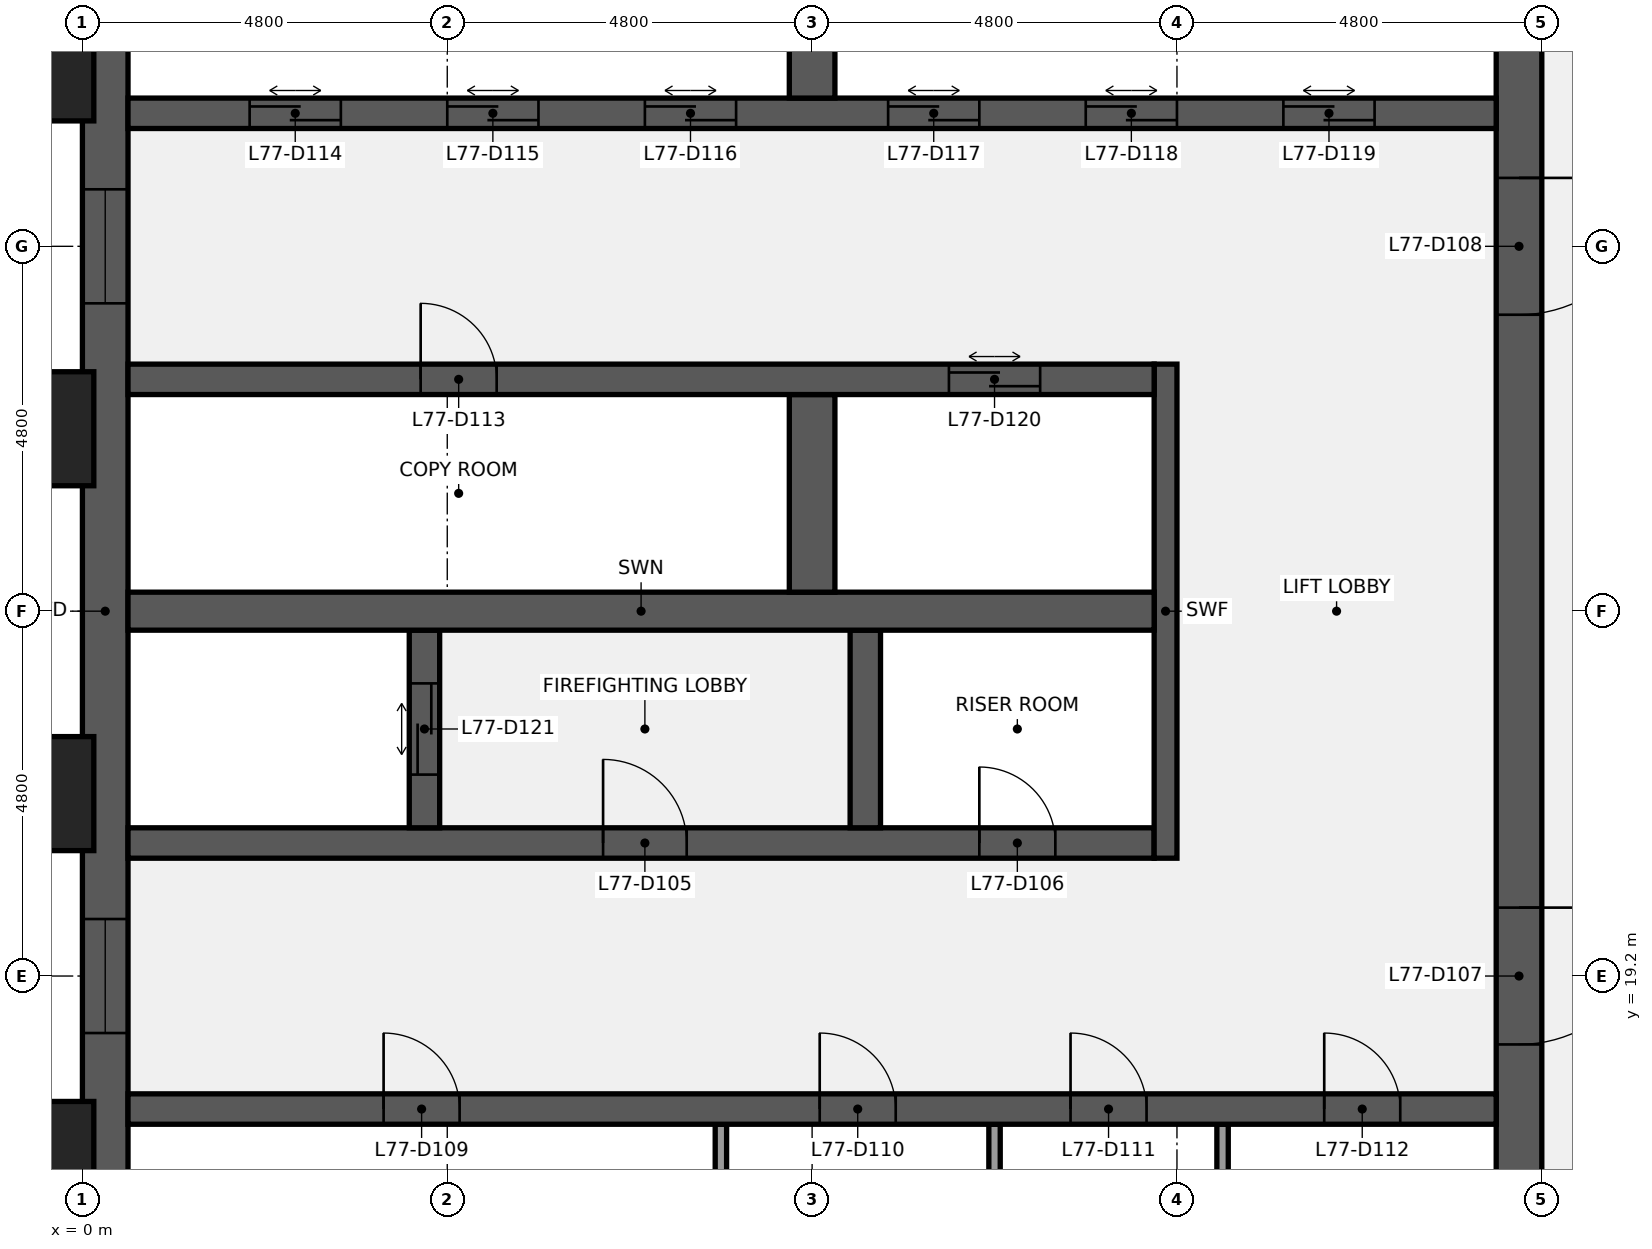
"""IFC4 building model, lengths in metres.
Left out: names, types, materials, properties, quantities, classifications, styles, units other than length and angle.
Written with IfcOpenShell. Run it as: python <this file> out.ifc"""

import sys

from ifc_helpers import new_model, si_unit, direction, frame, frame_2d, origin, origin_2d, place, context, subcontext, project, spatial, rectangle, extrude, element, fill, save


model = new_model("IFC4")
c1 = context("Model", 3, precision=1e-05, world=origin(), true_north=direction((0.0, 1.0)))
c2 = subcontext(c1, "Body", "Model", "MODEL_VIEW")
j1 = project(units=[si_unit("LENGTHUNIT", "METRE"), si_unit("PLANEANGLEUNIT", "RADIAN")], contexts=[c1])
p1 = place(None, origin())
s1 = spatial("IfcSite", under=j1, at=p1, CompositionType="ELEMENT")
p2 = place(p1, origin())
s2 = spatial("IfcBuilding", under=s1, at=p2, CompositionType="ELEMENT")
p3 = place(p2, frame((0.0, 0.0, 346.3)))
s3 = spatial("IfcBuildingStorey", under=s2, at=p3, CompositionType="ELEMENT", Elevation=346.3)
p4 = place(p3, frame((0.3, 9.6, 0.0), z_axis=(0.0, 0.0, 1.0), x_axis=(0.0, 1.0, 0.0)))
e1 = element("IfcWall", 1, at=p4, inside=s3, PredefinedType="SHEAR", context=c2, shape_type="SweptSolid", body=[
    extrude(rectangle(XDim=28.8, YDim=0.6, at=frame_2d((14.4, 0.0))), origin(), (0.0, 0.0, 1.0), 3.84),
])
p5 = place(p4, frame((8.85, 0.0, 0.9)))
e2 = element("IfcOpeningElement", 2, at=p5, cuts=e1, PredefinedType="OPENING", context=c2, shape_type="SweptSolid", body=[
    extrude(rectangle(XDim=1.5, YDim=1.5, at=frame_2d((0.75, 0.75))), frame((0.0, 0.31, 0.0), z_axis=(0.0, -1.0, 0.0), x_axis=(1.0, 0.0, 0.0)), (0.0, 0.0, 1.0), 0.62),
])
p6 = place(p4, frame((18.45, 0.0, 0.9)))
e3 = element("IfcOpeningElement", 3, at=p6, cuts=e1, PredefinedType="OPENING", context=c2, shape_type="SweptSolid", body=[
    extrude(rectangle(XDim=1.5, YDim=1.5, at=frame_2d((0.75, 0.75))), frame((0.0, 0.31, 0.0), z_axis=(0.0, -1.0, 0.0), x_axis=(1.0, 0.0, 0.0)), (0.0, 0.0, 1.0), 0.62),
])
p7 = place(p3, frame((18.9, 38.4, 0.0), z_axis=(0.0, 0.0, 1.0), x_axis=(0.0, -1.0, 0.0)))
e4 = element("IfcWall", 4, at=p7, inside=s3, PredefinedType="SHEAR", context=c2, shape_type="SweptSolid", body=[
    extrude(rectangle(XDim=28.8, YDim=0.6, at=frame_2d((14.4, 0.0))), origin(), (0.0, 0.0, 1.0), 3.84),
])
p8 = place(p7, frame((18.3, 0.0, 0.0)))
e5 = element("IfcOpeningElement", 5, at=p8, cuts=e4, PredefinedType="OPENING", context=c2, shape_type="SweptSolid", body=[
    extrude(rectangle(XDim=1.8, YDim=2.1, at=frame_2d((0.9, 1.05))), frame((0.0, 0.31, 0.0), z_axis=(0.0, -1.0, 0.0), x_axis=(1.0, 0.0, 0.0)), (0.0, 0.0, 1.0), 0.62),
])
p9 = place(p7, frame((8.7, 0.0, 0.0)))
e6 = element("IfcOpeningElement", 6, at=p9, cuts=e4, PredefinedType="OPENING", context=c2, shape_type="SweptSolid", body=[
    extrude(rectangle(XDim=1.8, YDim=2.1, at=frame_2d((0.9, 1.05))), frame((0.0, 0.31, 0.0), z_axis=(0.0, -1.0, 0.0), x_axis=(1.0, 0.0, 0.0)), (0.0, 0.0, 1.0), 0.62),
])
for number, where, z_axis, x_axis in (
    (7, (8.4, 14.65, 0.0), (0.0, 0.0, 1.0), (0.0, 1.0, 0.0)),
    (8, (12.0, 14.65, 0.0), (0.0, 0.0, 1.0), (0.0, 1.0, 0.0)),
    (9, (15.0, 14.65, 0.0), (0.0, 0.0, 1.0), (0.0, 1.0, 0.0)),
):
    element("IfcWall", number, at=place(p3, frame(where, z_axis=z_axis, x_axis=x_axis)), inside=s3, PredefinedType="PARTITIONING", context=c2, shape_type="SweptSolid", body=[
        extrude(rectangle(XDim=2.6, YDim=0.15, at=frame_2d((1.3, 0.0))), origin(), (0.0, 0.0, 1.0), 3.84),
    ])
p10 = place(p3, frame((0.6, 17.45, 0.0), z_axis=(0.0, 0.0, 1.0), x_axis=(1.0, 0.0, 0.0)))
e10 = element("IfcWall", 10, at=p10, inside=s3, PredefinedType="SHEAR", context=c2, shape_type="SweptSolid", body=[
    extrude(rectangle(XDim=18.0, YDim=0.4, at=frame_2d((9.0, 0.0))), origin(), (0.0, 0.0, 1.0), 3.84),
])
p11 = place(p10, frame((3.363, 0.0, 0.0)))
e11 = element("IfcOpeningElement", 11, at=p11, cuts=e10, PredefinedType="OPENING", context=c2, shape_type="SweptSolid", body=[
    extrude(rectangle(XDim=1.0, YDim=2.1, at=frame_2d((0.5, 1.05))), frame((0.0, 0.21, 0.0), z_axis=(0.0, -1.0, 0.0), x_axis=(1.0, 0.0, 0.0)), (0.0, 0.0, 1.0), 0.42),
])
p12 = place(p10, frame((9.1, 0.0, 0.0)))
e12 = element("IfcOpeningElement", 12, at=p12, cuts=e10, PredefinedType="OPENING", context=c2, shape_type="SweptSolid", body=[
    extrude(rectangle(XDim=1.0, YDim=2.1, at=frame_2d((0.5, 1.05))), frame((0.0, 0.21, 0.0), z_axis=(0.0, -1.0, 0.0), x_axis=(1.0, 0.0, 0.0)), (0.0, 0.0, 1.0), 0.42),
])
p13 = place(p10, frame((12.4, 0.0, 0.0)))
e13 = element("IfcOpeningElement", 13, at=p13, cuts=e10, PredefinedType="OPENING", context=c2, shape_type="SweptSolid", body=[
    extrude(rectangle(XDim=1.0, YDim=2.1, at=frame_2d((0.5, 1.05))), frame((0.0, 0.21, 0.0), z_axis=(0.0, -1.0, 0.0), x_axis=(1.0, 0.0, 0.0)), (0.0, 0.0, 1.0), 0.42),
])
p14 = place(p10, frame((15.738, 0.0, 0.0)))
e14 = element("IfcOpeningElement", 14, at=p14, cuts=e10, PredefinedType="OPENING", context=c2, shape_type="SweptSolid", body=[
    extrude(rectangle(XDim=1.0, YDim=2.1, at=frame_2d((0.5, 1.05))), frame((0.0, 0.21, 0.0), z_axis=(0.0, -1.0, 0.0), x_axis=(1.0, 0.0, 0.0)), (0.0, 0.0, 1.0), 0.42),
])
p15 = place(p3, frame((0.6, 20.95, 0.0), z_axis=(0.0, 0.0, 1.0), x_axis=(1.0, 0.0, 0.0)))
e15 = element("IfcWall", 15, at=p15, inside=s3, PredefinedType="SHEAR", context=c2, shape_type="SweptSolid", body=[
    extrude(rectangle(XDim=13.5, YDim=0.4, at=frame_2d((6.75, 0.0))), origin(), (0.0, 0.0, 1.0), 3.84),
])
p16 = place(p15, frame((6.25, 0.0, 0.0)))
e16 = element("IfcOpeningElement", 16, at=p16, cuts=e15, PredefinedType="OPENING", context=c2, shape_type="SweptSolid", body=[
    extrude(rectangle(XDim=1.1, YDim=2.1, at=frame_2d((0.55, 1.05))), frame((0.0, 0.21, 0.0), z_axis=(0.0, -1.0, 0.0), x_axis=(1.0, 0.0, 0.0)), (0.0, 0.0, 1.0), 0.42),
])
p17 = place(p15, frame((11.2, 0.0, 0.0)))
e17 = element("IfcOpeningElement", 17, at=p17, cuts=e15, PredefinedType="OPENING", context=c2, shape_type="SweptSolid", body=[
    extrude(rectangle(XDim=1.0, YDim=2.1, at=frame_2d((0.5, 1.05))), frame((0.0, 0.21, 0.0), z_axis=(0.0, -1.0, 0.0), x_axis=(1.0, 0.0, 0.0)), (0.0, 0.0, 1.0), 0.42),
])
p18 = place(p3, frame((14.25, 20.75, 0.0), z_axis=(0.0, 0.0, 1.0), x_axis=(0.0, 1.0, 0.0)))
e18 = element("IfcWall", 18, at=p18, inside=s3, PredefinedType="SHEAR", context=c2, shape_type="SweptSolid", body=[
    extrude(rectangle(XDim=6.5, YDim=0.3, at=frame_2d((3.25, 0.0))), origin(), (0.0, 0.0, 1.0), 3.84),
])
p19 = place(p3, frame((4.5, 21.15, 0.0), z_axis=(0.0, 0.0, 1.0), x_axis=(0.0, 1.0, 0.0)))
e19 = element("IfcWall", 19, at=p19, inside=s3, PredefinedType="SHEAR", context=c2, shape_type="SweptSolid", body=[
    extrude(rectangle(XDim=2.6, YDim=0.4, at=frame_2d((1.3, 0.0))), origin(), (0.0, 0.0, 1.0), 3.84),
])
p20 = place(p19, frame((0.7, 0.0, 0.0)))
e20 = element("IfcOpeningElement", 20, at=p20, cuts=e19, PredefinedType="OPENING", context=c2, shape_type="SweptSolid", body=[
    extrude(rectangle(XDim=1.2, YDim=2.1, at=frame_2d((0.6, 1.05))), frame((0.0, 0.21, 0.0), z_axis=(0.0, -1.0, 0.0), x_axis=(1.0, 0.0, 0.0)), (0.0, 0.0, 1.0), 0.42),
])
p21 = place(p3, frame((10.3, 21.15, 0.0), z_axis=(0.0, 0.0, 1.0), x_axis=(0.0, 1.0, 0.0)))
e21 = element("IfcWall", 21, at=p21, inside=s3, PredefinedType="SHEAR", context=c2, shape_type="SweptSolid", body=[
    extrude(rectangle(XDim=2.6, YDim=0.4, at=frame_2d((1.3, 0.0))), origin(), (0.0, 0.0, 1.0), 3.84),
])
p22 = place(p3, frame((0.6, 24.0, 0.0), z_axis=(0.0, 0.0, 1.0), x_axis=(1.0, 0.0, 0.0)))
e22 = element("IfcWall", 22, at=p22, inside=s3, PredefinedType="SHEAR", context=c2, shape_type="SweptSolid", body=[
    extrude(rectangle(XDim=13.5, YDim=0.5, at=frame_2d((6.75, 0.0))), origin(), (0.0, 0.0, 1.0), 3.84),
])
p23 = place(p3, frame((9.6, 24.25, 0.0), z_axis=(0.0, 0.0, 1.0), x_axis=(0.0, 1.0, 0.0)))
e23 = element("IfcWall", 23, at=p23, inside=s3, PredefinedType="SHEAR", context=c2, shape_type="SweptSolid", body=[
    extrude(rectangle(XDim=2.6, YDim=0.6, at=frame_2d((1.3, 0.0))), origin(), (0.0, 0.0, 1.0), 3.84),
])
p24 = place(p3, frame((0.6, 27.05, 0.0), z_axis=(0.0, 0.0, 1.0), x_axis=(1.0, 0.0, 0.0)))
e24 = element("IfcWall", 24, at=p24, inside=s3, PredefinedType="SHEAR", context=c2, shape_type="SweptSolid", body=[
    extrude(rectangle(XDim=13.5, YDim=0.4, at=frame_2d((6.75, 0.0))), origin(), (0.0, 0.0, 1.0), 3.84),
])
p25 = place(p24, frame((3.85, 0.0, 0.0)))
e25 = element("IfcOpeningElement", 25, at=p25, cuts=e24, PredefinedType="OPENING", context=c2, shape_type="SweptSolid", body=[
    extrude(rectangle(XDim=1.0, YDim=2.1, at=frame_2d((0.5, 1.05))), frame((0.0, 0.21, 0.0), z_axis=(0.0, -1.0, 0.0), x_axis=(1.0, 0.0, 0.0)), (0.0, 0.0, 1.0), 0.42),
])
p26 = place(p24, frame((10.8, 0.0, 0.0)))
e26 = element("IfcOpeningElement", 26, at=p26, cuts=e24, PredefinedType="OPENING", context=c2, shape_type="SweptSolid", body=[
    extrude(rectangle(XDim=1.2, YDim=2.1, at=frame_2d((0.6, 1.05))), frame((0.0, 0.21, 0.0), z_axis=(0.0, -1.0, 0.0), x_axis=(1.0, 0.0, 0.0)), (0.0, 0.0, 1.0), 0.42),
])
p27 = place(p3, frame((0.6, 30.55, 0.0), z_axis=(0.0, 0.0, 1.0), x_axis=(1.0, 0.0, 0.0)))
e27 = element("IfcWall", 27, at=p27, inside=s3, PredefinedType="SHEAR", context=c2, shape_type="SweptSolid", body=[
    extrude(rectangle(XDim=18.0, YDim=0.4, at=frame_2d((9.0, 0.0))), origin(), (0.0, 0.0, 1.0), 3.84),
])
p28 = place(p27, frame((1.6, 0.0, 0.0)))
e28 = element("IfcOpeningElement", 28, at=p28, cuts=e27, PredefinedType="OPENING", context=c2, shape_type="SweptSolid", body=[
    extrude(rectangle(XDim=1.2, YDim=2.1, at=frame_2d((0.6, 1.05))), frame((0.0, 0.21, 0.0), z_axis=(0.0, -1.0, 0.0), x_axis=(1.0, 0.0, 0.0)), (0.0, 0.0, 1.0), 0.42),
])
p29 = place(p27, frame((4.2, 0.0, 0.0)))
e29 = element("IfcOpeningElement", 29, at=p29, cuts=e27, PredefinedType="OPENING", context=c2, shape_type="SweptSolid", body=[
    extrude(rectangle(XDim=1.2, YDim=2.1, at=frame_2d((0.6, 1.05))), frame((0.0, 0.21, 0.0), z_axis=(0.0, -1.0, 0.0), x_axis=(1.0, 0.0, 0.0)), (0.0, 0.0, 1.0), 0.42),
])
p30 = place(p27, frame((6.8, 0.0, 0.0)))
e30 = element("IfcOpeningElement", 30, at=p30, cuts=e27, PredefinedType="OPENING", context=c2, shape_type="SweptSolid", body=[
    extrude(rectangle(XDim=1.2, YDim=2.1, at=frame_2d((0.6, 1.05))), frame((0.0, 0.21, 0.0), z_axis=(0.0, -1.0, 0.0), x_axis=(1.0, 0.0, 0.0)), (0.0, 0.0, 1.0), 0.42),
])
p31 = place(p27, frame((10.0, 0.0, 0.0)))
e31 = element("IfcOpeningElement", 31, at=p31, cuts=e27, PredefinedType="OPENING", context=c2, shape_type="SweptSolid", body=[
    extrude(rectangle(XDim=1.2, YDim=2.1, at=frame_2d((0.6, 1.05))), frame((0.0, 0.21, 0.0), z_axis=(0.0, -1.0, 0.0), x_axis=(1.0, 0.0, 0.0)), (0.0, 0.0, 1.0), 0.42),
])
p32 = place(p27, frame((12.6, 0.0, 0.0)))
e32 = element("IfcOpeningElement", 32, at=p32, cuts=e27, PredefinedType="OPENING", context=c2, shape_type="SweptSolid", body=[
    extrude(rectangle(XDim=1.2, YDim=2.1, at=frame_2d((0.6, 1.05))), frame((0.0, 0.21, 0.0), z_axis=(0.0, -1.0, 0.0), x_axis=(1.0, 0.0, 0.0)), (0.0, 0.0, 1.0), 0.42),
])
p33 = place(p27, frame((15.2, 0.0, 0.0)))
e33 = element("IfcOpeningElement", 33, at=p33, cuts=e27, PredefinedType="OPENING", context=c2, shape_type="SweptSolid", body=[
    extrude(rectangle(XDim=1.2, YDim=2.1, at=frame_2d((0.6, 1.05))), frame((0.0, 0.21, 0.0), z_axis=(0.0, -1.0, 0.0), x_axis=(1.0, 0.0, 0.0)), (0.0, 0.0, 1.0), 0.42),
])
p34 = place(p3, frame((9.6, 30.75, 0.0), z_axis=(0.0, 0.0, 1.0), x_axis=(0.0, 1.0, 0.0)))
e34 = element("IfcWall", 34, at=p34, inside=s3, PredefinedType="SHEAR", context=c2, shape_type="SweptSolid", body=[
    extrude(rectangle(XDim=2.6, YDim=0.6, at=frame_2d((1.3, 0.0))), origin(), (0.0, 0.0, 1.0), 3.84),
])
for number, where, z_axis, x_axis in (
    (35, (-0.75, 16.8, 0.0), (0.0, 0.0, 1.0), (0.0, 1.0, 0.0)),
    (36, (-0.75, 21.6, 0.0), (0.0, 0.0, 1.0), (0.0, 1.0, 0.0)),
    (37, (-0.75, 26.4, 0.0), (0.0, 0.0, 1.0), (0.0, 1.0, 0.0)),
    (38, (-0.75, 31.2, 0.0), (0.0, 0.0, 1.0), (0.0, 1.0, 0.0)),
):
    element("IfcColumn", number, at=place(p3, frame(where, z_axis=z_axis, x_axis=x_axis)), inside=s3, PredefinedType="PILASTER", context=c2, shape_type="SweptSolid", body=[
        extrude(rectangle(XDim=1.8, YDim=1.5, at=origin_2d()), origin(), (0.0, 0.0, 1.0), 4.0),
    ])
p35 = place(p16, origin())
e39 = element("IfcDoor", 39, at=p35, inside=s3, OperationType="SINGLE_SWING_LEFT", PredefinedType="DOOR", context=c2, shape_type="SweptSolid", body=[
    extrude(rectangle(XDim=1.1, YDim=2.1, at=frame_2d((0.55, 1.05))), frame((0.0, 0.025, 0.0), z_axis=(0.0, -1.0, 0.0), x_axis=(1.0, 0.0, 0.0)), (0.0, 0.0, 1.0), 0.05),
])
fill(e16, e39)
p36 = place(p17, origin())
e40 = element("IfcDoor", 40, at=p36, inside=s3, OperationType="SINGLE_SWING_LEFT", PredefinedType="DOOR", context=c2, shape_type="SweptSolid", body=[
    extrude(rectangle(XDim=1.0, YDim=2.1, at=frame_2d((0.5, 1.05))), frame((0.0, 0.025, 0.0), z_axis=(0.0, -1.0, 0.0), x_axis=(1.0, 0.0, 0.0)), (0.0, 0.0, 1.0), 0.05),
])
fill(e17, e40)
p37 = place(p8, origin())
e41 = element("IfcDoor", 41, at=p37, inside=s3, OperationType="DOUBLE_DOOR_SINGLE_SWING", PredefinedType="DOOR", context=c2, shape_type="SweptSolid", body=[
    extrude(rectangle(XDim=1.8, YDim=2.1, at=frame_2d((0.9, 1.05))), frame((0.0, 0.025, 0.0), z_axis=(0.0, -1.0, 0.0), x_axis=(1.0, 0.0, 0.0)), (0.0, 0.0, 1.0), 0.05),
])
fill(e5, e41)
p38 = place(p9, origin())
e42 = element("IfcDoor", 42, at=p38, inside=s3, OperationType="DOUBLE_DOOR_SINGLE_SWING", PredefinedType="DOOR", context=c2, shape_type="SweptSolid", body=[
    extrude(rectangle(XDim=1.8, YDim=2.1, at=frame_2d((0.9, 1.05))), frame((0.0, 0.025, 0.0), z_axis=(0.0, -1.0, 0.0), x_axis=(1.0, 0.0, 0.0)), (0.0, 0.0, 1.0), 0.05),
])
fill(e6, e42)
p39 = place(p11, origin())
e43 = element("IfcDoor", 43, at=p39, inside=s3, OperationType="SINGLE_SWING_LEFT", PredefinedType="DOOR", context=c2, shape_type="SweptSolid", body=[
    extrude(rectangle(XDim=1.0, YDim=2.1, at=frame_2d((0.5, 1.05))), frame((0.0, 0.025, 0.0), z_axis=(0.0, -1.0, 0.0), x_axis=(1.0, 0.0, 0.0)), (0.0, 0.0, 1.0), 0.05),
])
fill(e11, e43)
p40 = place(p12, origin())
e44 = element("IfcDoor", 44, at=p40, inside=s3, OperationType="SINGLE_SWING_LEFT", PredefinedType="DOOR", context=c2, shape_type="SweptSolid", body=[
    extrude(rectangle(XDim=1.0, YDim=2.1, at=frame_2d((0.5, 1.05))), frame((0.0, 0.025, 0.0), z_axis=(0.0, -1.0, 0.0), x_axis=(1.0, 0.0, 0.0)), (0.0, 0.0, 1.0), 0.05),
])
fill(e12, e44)
p41 = place(p13, origin())
e45 = element("IfcDoor", 45, at=p41, inside=s3, OperationType="SINGLE_SWING_LEFT", PredefinedType="DOOR", context=c2, shape_type="SweptSolid", body=[
    extrude(rectangle(XDim=1.0, YDim=2.1, at=frame_2d((0.5, 1.05))), frame((0.0, 0.025, 0.0), z_axis=(0.0, -1.0, 0.0), x_axis=(1.0, 0.0, 0.0)), (0.0, 0.0, 1.0), 0.05),
])
fill(e13, e45)
p42 = place(p14, origin())
e46 = element("IfcDoor", 46, at=p42, inside=s3, OperationType="SINGLE_SWING_LEFT", PredefinedType="DOOR", context=c2, shape_type="SweptSolid", body=[
    extrude(rectangle(XDim=1.0, YDim=2.1, at=frame_2d((0.5, 1.05))), frame((0.0, 0.025, 0.0), z_axis=(0.0, -1.0, 0.0), x_axis=(1.0, 0.0, 0.0)), (0.0, 0.0, 1.0), 0.05),
])
fill(e14, e46)
p43 = place(p25, origin())
e47 = element("IfcDoor", 47, at=p43, inside=s3, OperationType="SINGLE_SWING_LEFT", PredefinedType="DOOR", context=c2, shape_type="SweptSolid", body=[
    extrude(rectangle(XDim=1.0, YDim=2.1, at=frame_2d((0.5, 1.05))), frame((0.0, 0.025, 0.0), z_axis=(0.0, -1.0, 0.0), x_axis=(1.0, 0.0, 0.0)), (0.0, 0.0, 1.0), 0.05),
])
fill(e25, e47)
p44 = place(p28, origin())
e48 = element("IfcDoor", 48, at=p44, inside=s3, OperationType="DOUBLE_DOOR_SLIDING", PredefinedType="DOOR", context=c2, shape_type="SweptSolid", body=[
    extrude(rectangle(XDim=1.2, YDim=2.1, at=frame_2d((0.6, 1.05))), frame((0.0, 0.025, 0.0), z_axis=(0.0, -1.0, 0.0), x_axis=(1.0, 0.0, 0.0)), (0.0, 0.0, 1.0), 0.05),
])
fill(e28, e48)
p45 = place(p29, origin())
e49 = element("IfcDoor", 49, at=p45, inside=s3, OperationType="DOUBLE_DOOR_SLIDING", PredefinedType="DOOR", context=c2, shape_type="SweptSolid", body=[
    extrude(rectangle(XDim=1.2, YDim=2.1, at=frame_2d((0.6, 1.05))), frame((0.0, 0.025, 0.0), z_axis=(0.0, -1.0, 0.0), x_axis=(1.0, 0.0, 0.0)), (0.0, 0.0, 1.0), 0.05),
])
fill(e29, e49)
p46 = place(p30, origin())
e50 = element("IfcDoor", 50, at=p46, inside=s3, OperationType="DOUBLE_DOOR_SLIDING", PredefinedType="DOOR", context=c2, shape_type="SweptSolid", body=[
    extrude(rectangle(XDim=1.2, YDim=2.1, at=frame_2d((0.6, 1.05))), frame((0.0, 0.025, 0.0), z_axis=(0.0, -1.0, 0.0), x_axis=(1.0, 0.0, 0.0)), (0.0, 0.0, 1.0), 0.05),
])
fill(e30, e50)
p47 = place(p31, origin())
e51 = element("IfcDoor", 51, at=p47, inside=s3, OperationType="DOUBLE_DOOR_SLIDING", PredefinedType="DOOR", context=c2, shape_type="SweptSolid", body=[
    extrude(rectangle(XDim=1.2, YDim=2.1, at=frame_2d((0.6, 1.05))), frame((0.0, 0.025, 0.0), z_axis=(0.0, -1.0, 0.0), x_axis=(1.0, 0.0, 0.0)), (0.0, 0.0, 1.0), 0.05),
])
fill(e31, e51)
p48 = place(p32, origin())
e52 = element("IfcDoor", 52, at=p48, inside=s3, OperationType="DOUBLE_DOOR_SLIDING", PredefinedType="DOOR", context=c2, shape_type="SweptSolid", body=[
    extrude(rectangle(XDim=1.2, YDim=2.1, at=frame_2d((0.6, 1.05))), frame((0.0, 0.025, 0.0), z_axis=(0.0, -1.0, 0.0), x_axis=(1.0, 0.0, 0.0)), (0.0, 0.0, 1.0), 0.05),
])
fill(e32, e52)
p49 = place(p33, origin())
e53 = element("IfcDoor", 53, at=p49, inside=s3, OperationType="DOUBLE_DOOR_SLIDING", PredefinedType="DOOR", context=c2, shape_type="SweptSolid", body=[
    extrude(rectangle(XDim=1.2, YDim=2.1, at=frame_2d((0.6, 1.05))), frame((0.0, 0.025, 0.0), z_axis=(0.0, -1.0, 0.0), x_axis=(1.0, 0.0, 0.0)), (0.0, 0.0, 1.0), 0.05),
])
fill(e33, e53)
p50 = place(p26, origin())
e54 = element("IfcDoor", 54, at=p50, inside=s3, OperationType="DOUBLE_DOOR_SLIDING", PredefinedType="DOOR", context=c2, shape_type="SweptSolid", body=[
    extrude(rectangle(XDim=1.2, YDim=2.1, at=frame_2d((0.6, 1.05))), frame((0.0, 0.025, 0.0), z_axis=(0.0, -1.0, 0.0), x_axis=(1.0, 0.0, 0.0)), (0.0, 0.0, 1.0), 0.05),
])
fill(e26, e54)
p51 = place(p20, origin())
e55 = element("IfcDoor", 55, at=p51, inside=s3, OperationType="DOUBLE_DOOR_SLIDING", PredefinedType="DOOR", context=c2, shape_type="SweptSolid", body=[
    extrude(rectangle(XDim=1.2, YDim=2.1, at=frame_2d((0.6, 1.05))), frame((0.0, 0.025, 0.0), z_axis=(0.0, -1.0, 0.0), x_axis=(1.0, 0.0, 0.0)), (0.0, 0.0, 1.0), 0.05),
])
fill(e20, e55)
p52 = place(p5, origin())
e56 = element("IfcWindow", 56, at=p52, inside=s3, PartitioningType="SINGLE_PANEL", PredefinedType="WINDOW", context=c2, shape_type="SweptSolid", body=[
    extrude(rectangle(XDim=1.5, YDim=1.5, at=frame_2d((0.75, 0.75))), frame((0.0, 0.03, 0.0), z_axis=(0.0, -1.0, 0.0), x_axis=(1.0, 0.0, 0.0)), (0.0, 0.0, 1.0), 0.06),
])
fill(e2, e56)
p53 = place(p6, origin())
e57 = element("IfcWindow", 57, at=p53, inside=s3, PartitioningType="SINGLE_PANEL", PredefinedType="WINDOW", context=c2, shape_type="SweptSolid", body=[
    extrude(rectangle(XDim=1.5, YDim=1.5, at=frame_2d((0.75, 0.75))), frame((0.0, 0.03, 0.0), z_axis=(0.0, -1.0, 0.0), x_axis=(1.0, 0.0, 0.0)), (0.0, 0.0, 1.0), 0.06),
])
fill(e3, e57)
save(model, sys.argv[1])
